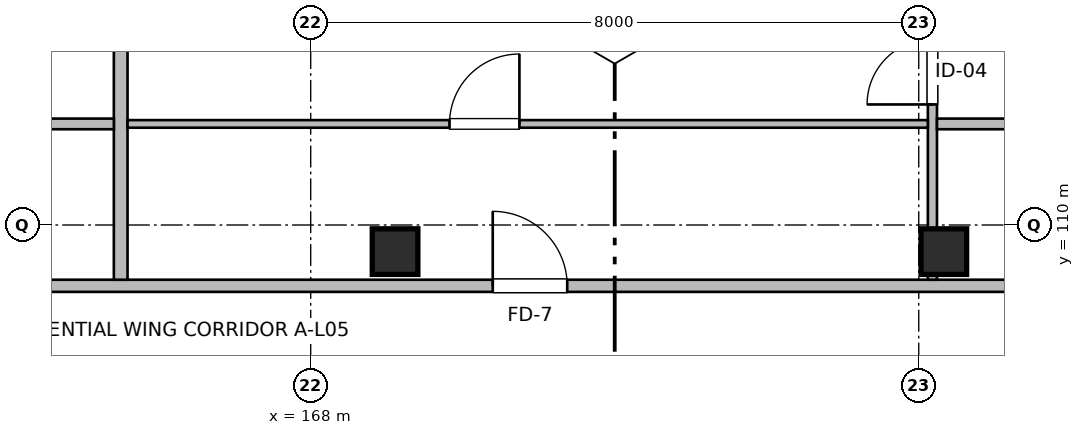
"""IFC4 building model, lengths in metres.
Left out: names, types, materials, properties, quantities, classifications, styles, units other than length and angle.
Written with IfcOpenShell. Run it as: python <this file> out.ifc"""

import sys

from ifc_helpers import new_model, si_unit, direction, frame, frame_2d, origin, origin_2d, place, context, subcontext, project, spatial, rectangle, extrude, element, fill, save


model = new_model("IFC4")
c1 = context("Model", 3, precision=1e-05, world=origin(), true_north=direction((0.0, 1.0)))
c2 = subcontext(c1, "Body", "Model", "MODEL_VIEW")
j1 = project(units=[si_unit("LENGTHUNIT", "METRE"), si_unit("PLANEANGLEUNIT", "RADIAN")], contexts=[c1])
p1 = place(None, origin())
s1 = spatial("IfcSite", under=j1, at=p1, CompositionType="ELEMENT")
p2 = place(p1, origin())
s2 = spatial("IfcBuilding", under=s1, at=p2, CompositionType="ELEMENT")
p3 = place(p2, frame((0.0, 0.0, 16.96)))
s3 = spatial("IfcBuildingStorey", under=s2, at=p3, CompositionType="ELEMENT", Elevation=16.96)
for number, where, z_axis, x_axis in (
    (1, (169.11, 109.65, 0.0), (0.0, 0.0, 1.0), (1.0, 0.0, 0.0)),
    (2, (176.33, 109.65, 0.0), (0.0, 0.0, 1.0), (1.0, 0.0, 0.0)),
):
    element("IfcColumn", number, at=place(p3, frame(where, z_axis=z_axis, x_axis=x_axis)), inside=s3, PredefinedType="COLUMN", context=c2, shape_type="SweptSolid", body=[
        extrude(rectangle(XDim=0.6, YDim=0.6, at=origin_2d()), origin(), (0.0, 0.0, 1.0), 3.2),
    ])
p4 = place(p3, frame((147.16, 109.2, 0.0), z_axis=(0.0, 0.0, 1.0), x_axis=(1.0, 0.0, 0.0)))
e3 = element("IfcWall", 3, at=p4, inside=s3, PredefinedType="PARTITIONING", context=c2, shape_type="SweptSolid", body=[
    extrude(rectangle(XDim=36.68, YDim=0.16, at=frame_2d((18.34, 0.0))), origin(), (0.0, 0.0, 1.0), 2.935),
])
p5 = place(p4, frame((4.805, 0.0, 0.0)))
e4 = element("IfcOpeningElement", 4, at=p5, cuts=e3, PredefinedType="OPENING", context=c2, shape_type="SweptSolid", body=[
    extrude(rectangle(XDim=0.98, YDim=2.15, at=frame_2d((0.49, 1.075))), frame((0.0, 0.09, 0.0), z_axis=(0.0, -1.0, 0.0), x_axis=(1.0, 0.0, 0.0)), (0.0, 0.0, 1.0), 0.18),
])
p6 = place(p4, frame((23.235, 0.0, 0.0)))
e5 = element("IfcOpeningElement", 5, at=p6, cuts=e3, PredefinedType="OPENING", context=c2, shape_type="SweptSolid", body=[
    extrude(rectangle(XDim=0.98, YDim=2.15, at=frame_2d((0.49, 1.075))), frame((0.0, 0.09, 0.0), z_axis=(0.0, -1.0, 0.0), x_axis=(1.0, 0.0, 0.0)), (0.0, 0.0, 1.0), 0.18),
])
p7 = place(p3, frame((165.5, 109.28, 0.0), z_axis=(0.0, 0.0, 1.0), x_axis=(0.0, 1.0, 0.0)))
e6 = element("IfcWall", 6, at=p7, inside=s3, PredefinedType="PARTITIONING", context=c2, shape_type="SweptSolid", body=[
    extrude(rectangle(XDim=6.59, YDim=0.18, at=frame_2d((3.295, 0.0))), origin(), (0.0, 0.0, 1.0), 2.935),
])
p8 = place(p3, frame((157.81, 111.33, 0.0), z_axis=(0.0, 0.0, 1.0), x_axis=(1.0, 0.0, 0.0)))
e7 = element("IfcWall", 7, at=p8, inside=s3, PredefinedType="PARTITIONING", context=c2, shape_type="SweptSolid", body=[
    extrude(rectangle(XDim=7.6, YDim=0.14, at=frame_2d((3.8, 0.0))), origin(), (0.0, 0.0, 1.0), 2.935),
])
p9 = place(p8, frame((3.064, 0.0, 0.0)))
e8 = element("IfcOpeningElement", 8, at=p9, cuts=e7, PredefinedType="OPENING", context=c2, shape_type="SweptSolid", body=[
    extrude(rectangle(XDim=0.85, YDim=2.05, at=frame_2d((0.425, 1.025))), frame((0.0, 0.08, 0.0), z_axis=(0.0, -1.0, 0.0), x_axis=(1.0, 0.0, 0.0)), (0.0, 0.0, 1.0), 0.16),
])
p10 = place(p3, frame((176.18, 109.28, 0.0), z_axis=(0.0, 0.0, 1.0), x_axis=(0.0, 1.0, 0.0)))
e9 = element("IfcWall", 9, at=p10, inside=s3, PredefinedType="PARTITIONING", context=c2, shape_type="SweptSolid", body=[
    extrude(rectangle(XDim=6.59, YDim=0.12, at=frame_2d((3.295, 0.0))), origin(), (0.0, 0.0, 1.0), 2.58),
])
p11 = place(p10, frame((2.306, 0.0, 0.0)))
e10 = element("IfcOpeningElement", 10, at=p11, cuts=e9, PredefinedType="OPENING", context=c2, shape_type="SweptSolid", body=[
    extrude(rectangle(XDim=0.86, YDim=2.1, at=frame_2d((0.43, 1.05))), frame((0.0, 0.07, 0.0), z_axis=(0.0, -1.0, 0.0), x_axis=(1.0, 0.0, 0.0)), (0.0, 0.0, 1.0), 0.14),
])
p12 = place(p10, frame((4.093, 0.0, 0.0)))
e11 = element("IfcOpeningElement", 11, at=p12, cuts=e9, PredefinedType="OPENING", context=c2, shape_type="SweptSolid", body=[
    extrude(rectangle(XDim=0.9, YDim=2.1, at=frame_2d((0.45, 1.05))), frame((0.0, 0.07, 0.0), z_axis=(0.0, -1.0, 0.0), x_axis=(1.0, 0.0, 0.0)), (0.0, 0.0, 1.0), 0.14),
])
p13 = place(p3, frame((176.24, 111.33, 0.0), z_axis=(0.0, 0.0, 1.0), x_axis=(1.0, 0.0, 0.0)))
e12 = element("IfcWall", 12, at=p13, inside=s3, PredefinedType="PARTITIONING", context=c2, shape_type="SweptSolid", body=[
    extrude(rectangle(XDim=7.6, YDim=0.14, at=frame_2d((3.8, 0.0))), origin(), (0.0, 0.0, 1.0), 2.935),
])
p14 = place(p13, frame((3.064, 0.0, 0.0)))
e13 = element("IfcOpeningElement", 13, at=p14, cuts=e12, PredefinedType="OPENING", context=c2, shape_type="SweptSolid", body=[
    extrude(rectangle(XDim=0.85, YDim=2.05, at=frame_2d((0.425, 1.025))), frame((0.0, 0.08, 0.0), z_axis=(0.0, -1.0, 0.0), x_axis=(1.0, 0.0, 0.0)), (0.0, 0.0, 1.0), 0.16),
])
p15 = place(p3, frame((165.59, 111.33, 0.0), z_axis=(0.0, 0.0, 1.0), x_axis=(1.0, 0.0, 0.0)))
e14 = element("IfcWall", 14, at=p15, inside=s3, PredefinedType="PARTITIONING", context=c2, shape_type="SweptSolid", body=[
    extrude(rectangle(XDim=10.53, YDim=0.1, at=frame_2d((5.265, 0.0))), origin(), (0.0, 0.0, 1.0), 2.935),
])
p16 = place(p15, frame((4.236, 0.0, 0.0)))
e15 = element("IfcOpeningElement", 15, at=p16, cuts=e14, PredefinedType="OPENING", context=c2, shape_type="SweptSolid", body=[
    extrude(rectangle(XDim=0.92, YDim=2.1, at=frame_2d((0.46, 1.05))), frame((0.0, 0.06, 0.0), z_axis=(0.0, -1.0, 0.0), x_axis=(1.0, 0.0, 0.0)), (0.0, 0.0, 1.0), 0.12),
])
p17 = place(p6, origin())
e16 = element("IfcDoor", 16, at=p17, inside=s3, OperationType="SINGLE_SWING_LEFT", PredefinedType="DOOR", context=c2, shape_type="SweptSolid", body=[
    extrude(rectangle(XDim=0.98, YDim=2.15, at=frame_2d((0.49, 1.075))), frame((0.0, 0.025, 0.0), z_axis=(0.0, -1.0, 0.0), x_axis=(1.0, 0.0, 0.0)), (0.0, 0.0, 1.0), 0.05),
])
fill(e5, e16)
p18 = place(p16, origin())
e17 = element("IfcDoor", 17, at=p18, inside=s3, OperationType="SINGLE_SWING_RIGHT", PredefinedType="DOOR", context=c2, shape_type="SweptSolid", body=[
    extrude(rectangle(XDim=0.92, YDim=2.1, at=frame_2d((0.46, 1.05))), frame((0.0, 0.025, 0.0), z_axis=(0.0, -1.0, 0.0), x_axis=(1.0, 0.0, 0.0)), (0.0, 0.0, 1.0), 0.05),
])
fill(e15, e17)
p19 = place(p11, origin())
e18 = element("IfcDoor", 18, at=p19, inside=s3, OperationType="SINGLE_SWING_LEFT", PredefinedType="DOOR", context=c2, shape_type="SweptSolid", body=[
    extrude(rectangle(XDim=0.86, YDim=2.1, at=frame_2d((0.43, 1.05))), frame((0.0, 0.025, 0.0), z_axis=(0.0, -1.0, 0.0), x_axis=(1.0, 0.0, 0.0)), (0.0, 0.0, 1.0), 0.05),
])
fill(e10, e18)
save(model, sys.argv[1])
